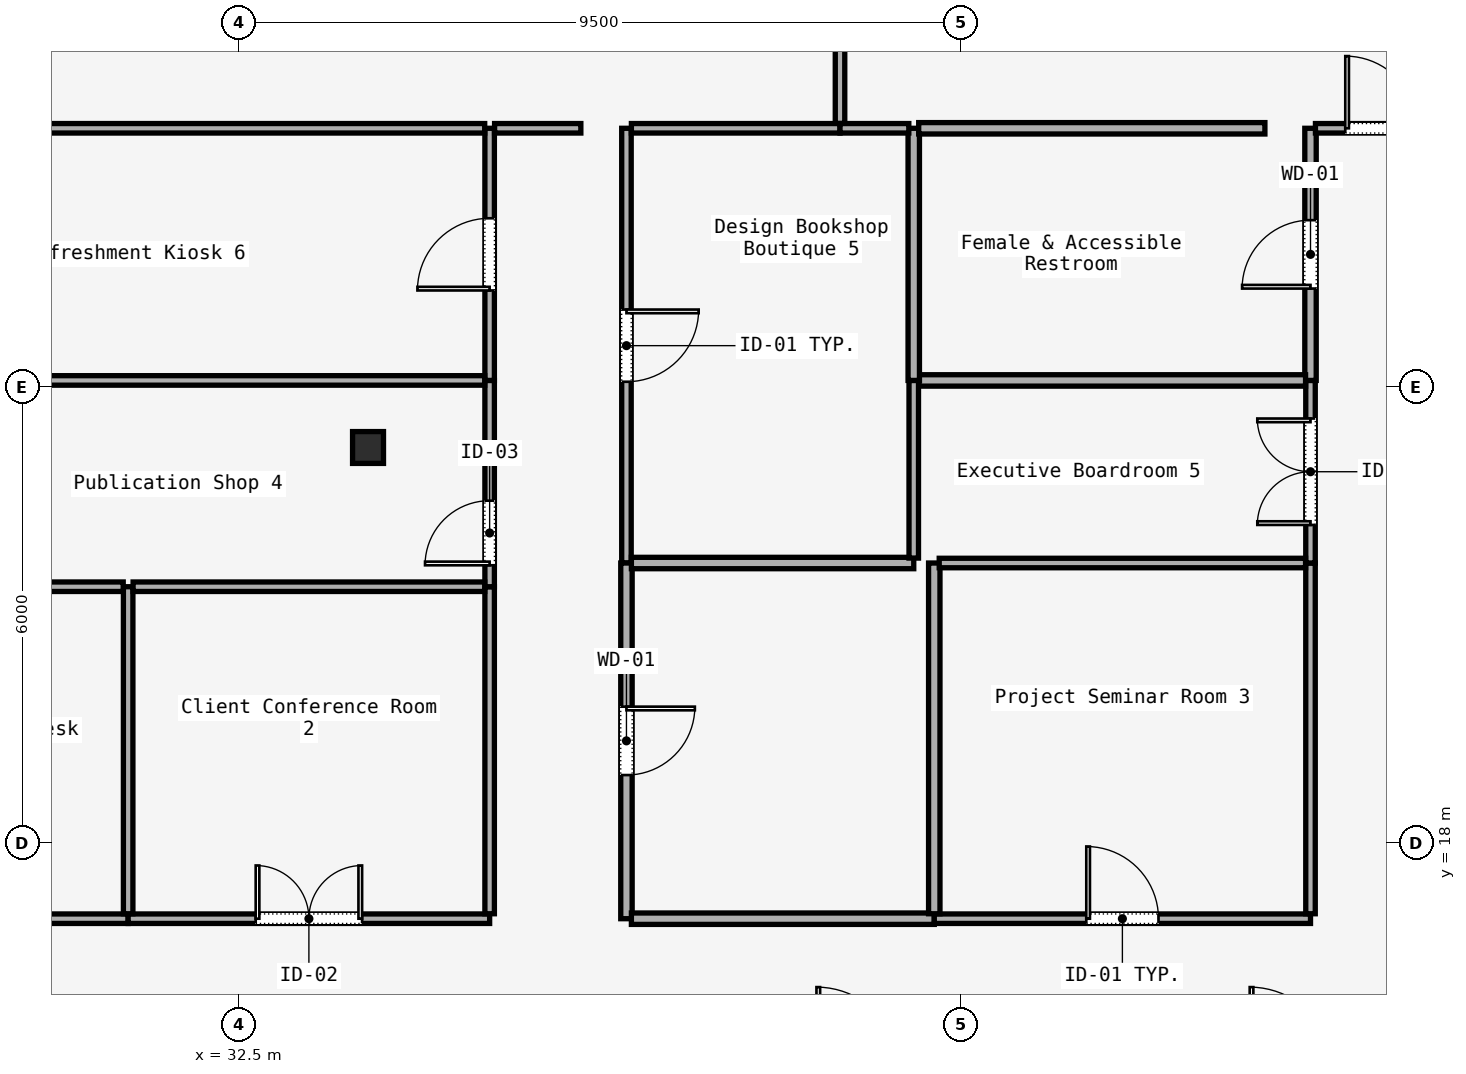
"""IFC4 building model, lengths in metres.
Left out: names, types, materials, properties, quantities, classifications, styles, units other than length and angle.
Written with IfcOpenShell. Run it as: python <this file> out.ifc"""

import sys

from ifc_helpers import new_model, si_unit, direction, frame, frame_2d, origin, origin_2d, place, context, subcontext, project, spatial, rectangle, i_section, extrude, element, fill, save


model = new_model("IFC4")
c1 = context("Model", 3, precision=1e-05, world=origin(), true_north=direction((0.0, 1.0)))
c2 = subcontext(c1, "Body", "Model", "MODEL_VIEW")
j1 = project(units=[si_unit("LENGTHUNIT", "METRE"), si_unit("PLANEANGLEUNIT", "RADIAN")], contexts=[c1])
p1 = place(None, origin())
s1 = spatial("IfcSite", under=j1, at=p1, CompositionType="ELEMENT")
p2 = place(p1, origin())
s2 = spatial("IfcBuilding", under=s1, at=p2, CompositionType="ELEMENT")
p3 = place(p2, frame((0.0, 0.0, 180.2)))
s3 = spatial("IfcBuildingStorey", under=s2, at=p3, CompositionType="ELEMENT", Elevation=180.2)
p4 = place(p3, frame((34.2, 23.2, 0.0), z_axis=(0.0, 0.0, 1.0), x_axis=(1.0, 0.0, 0.0)))
e1 = element("IfcColumn", 1, at=p4, inside=s3, PredefinedType="COLUMN", context=c2, shape_type="SweptSolid", body=[
    extrude(i_section(OverallWidth=0.407, OverallDepth=0.419, WebThickness=0.031, FlangeThickness=0.049, FilletRadius=0.015, at=origin_2d()), origin(), (0.0, 0.0, 1.0), 3.58),
])
p5 = place(p3, frame((27.6, 17.0, 0.0), z_axis=(0.0, 0.0, 1.0), x_axis=(1.0, 0.0, 0.0)))
e2 = element("IfcWall", 2, at=p5, inside=s3, PredefinedType="PARTITIONING", context=c2, shape_type="SweptSolid", body=[
    extrude(rectangle(XDim=3.444, YDim=0.125, at=frame_2d((1.722, 0.0))), origin(), (0.0, 0.0, 1.0), 3.01),
])
p6 = place(p5, frame((1.022, 0.0, 0.0)))
e3 = element("IfcOpeningElement", 3, at=p6, cuts=e2, PredefinedType="OPENING", context=c2, shape_type="SweptSolid", body=[
    extrude(rectangle(XDim=1.4, YDim=2.2, at=frame_2d((0.7, 1.1))), frame((0.0, 0.062, 0.0), z_axis=(0.0, -1.0, 0.0), x_axis=(1.0, 0.0, 0.0)), (0.0, 0.0, 1.0), 0.125),
])
p7 = place(p3, frame((31.044, 17.0, 0.0), z_axis=(0.0, 0.0, 1.0), x_axis=(1.0, 0.0, 0.0)))
e4 = element("IfcWall", 4, at=p7, inside=s3, PredefinedType="PARTITIONING", context=c2, shape_type="SweptSolid", body=[
    extrude(rectangle(XDim=4.756, YDim=0.125, at=frame_2d((2.378, 0.0))), origin(), (0.0, 0.0, 1.0), 3.01),
])
p8 = place(p7, frame((1.678, 0.0, 0.0)))
e5 = element("IfcOpeningElement", 5, at=p8, cuts=e4, PredefinedType="OPENING", context=c2, shape_type="SweptSolid", body=[
    extrude(rectangle(XDim=1.4, YDim=2.2, at=frame_2d((0.7, 1.1))), frame((0.0, 0.062, 0.0), z_axis=(0.0, -1.0, 0.0), x_axis=(1.0, 0.0, 0.0)), (0.0, 0.0, 1.0), 0.125),
])
p9 = place(p3, frame((35.8, 17.065, 0.0), z_axis=(0.0, 0.0, 1.0), x_axis=(0.0, 1.0, 0.0)))
e6 = element("IfcWall", 6, at=p9, inside=s3, PredefinedType="PARTITIONING", context=c2, shape_type="SweptSolid", body=[
    extrude(rectangle(XDim=4.303, YDim=0.125, at=frame_2d((2.151, 0.0))), origin(), (0.0, 0.0, 1.0), 3.01),
])
p10 = place(p3, frame((35.8, 21.368, 0.0), z_axis=(0.0, 0.0, 1.0), x_axis=(0.0, 1.0, 0.0)))
e7 = element("IfcWall", 7, at=p10, inside=s3, PredefinedType="PARTITIONING", context=c2, shape_type="SweptSolid", body=[
    extrude(rectangle(XDim=2.715, YDim=0.125, at=frame_2d((1.357, 0.0))), origin(), (0.0, 0.0, 1.0), 3.01),
])
p11 = place(p10, frame((0.282, 0.0, 0.0)))
e8 = element("IfcOpeningElement", 8, at=p11, cuts=e7, PredefinedType="OPENING", context=c2, shape_type="SweptSolid", body=[
    extrude(rectangle(XDim=0.85, YDim=2.15, at=frame_2d((0.425, 1.075))), frame((0.0, 0.062, 0.0), z_axis=(0.0, -1.0, 0.0), x_axis=(1.0, 0.0, 0.0)), (0.0, 0.0, 1.0), 0.125),
])
p12 = place(p3, frame((35.8, 24.083, 0.0), z_axis=(0.0, 0.0, 1.0), x_axis=(0.0, 1.0, 0.0)))
e9 = element("IfcWall", 9, at=p12, inside=s3, PredefinedType="PARTITIONING", context=c2, shape_type="SweptSolid", body=[
    extrude(rectangle(XDim=3.317, YDim=0.125, at=frame_2d((1.659, 0.0))), origin(), (0.0, 0.0, 1.0), 3.01),
])
p13 = place(p12, frame((1.184, 0.0, 0.0)))
e10 = element("IfcOpeningElement", 10, at=p13, cuts=e9, PredefinedType="OPENING", context=c2, shape_type="SweptSolid", body=[
    extrude(rectangle(XDim=0.95, YDim=2.2, at=frame_2d((0.475, 1.1))), frame((0.0, 0.062, 0.0), z_axis=(0.0, -1.0, 0.0), x_axis=(1.0, 0.0, 0.0)), (0.0, 0.0, 1.0), 0.125),
])
p14 = place(p3, frame((35.865, 27.4, 0.0), z_axis=(0.0, 0.0, 1.0), x_axis=(1.0, 0.0, 0.0)))
e11 = element("IfcWall", 11, at=p14, inside=s3, PredefinedType="PARTITIONING", context=c2, shape_type="SweptSolid", body=[
    extrude(rectangle(XDim=1.135, YDim=0.125, at=frame_2d((0.567, 0.0))), origin(), (0.0, 0.0, 1.0), 3.01),
])
p15 = place(p3, frame((37.6, 27.4, 0.0), z_axis=(0.0, 0.0, 1.0), x_axis=(0.0, -1.0, 0.0)))
e12 = element("IfcWall", 12, at=p15, inside=s3, PredefinedType="PARTITIONING", context=c2, shape_type="SweptSolid", body=[
    extrude(rectangle(XDim=5.72, YDim=0.125, at=frame_2d((2.86, 0.0))), origin(), (0.0, 0.0, 1.0), 3.01),
])
p16 = place(p15, frame((2.385, 0.0, 0.0)))
e13 = element("IfcOpeningElement", 13, at=p16, cuts=e12, PredefinedType="OPENING", context=c2, shape_type="SweptSolid", body=[
    extrude(rectangle(XDim=0.95, YDim=2.2, at=frame_2d((0.475, 1.1))), frame((0.0, 0.062, 0.0), z_axis=(0.0, -1.0, 0.0), x_axis=(1.0, 0.0, 0.0)), (0.0, 0.0, 1.0), 0.125),
])
p17 = place(p3, frame((37.6, 21.68, 0.0), z_axis=(0.0, 0.0, 1.0), x_axis=(0.0, -1.0, 0.0)))
e14 = element("IfcWall", 14, at=p17, inside=s3, PredefinedType="PARTITIONING", context=c2, shape_type="SweptSolid", body=[
    extrude(rectangle(XDim=4.68, YDim=0.15, at=frame_2d((2.34, 0.0))), origin(), (0.0, 0.0, 1.0), 3.01),
])
p18 = place(p17, frame((1.89, 0.0, 0.0)))
e15 = element("IfcOpeningElement", 15, at=p18, cuts=e14, PredefinedType="OPENING", context=c2, shape_type="SweptSolid", body=[
    extrude(rectangle(XDim=0.9, YDim=2.15, at=frame_2d((0.45, 1.075))), frame((0.0, 0.075, 0.0), z_axis=(0.0, -1.0, 0.0), x_axis=(1.0, 0.0, 0.0)), (0.0, 0.0, 1.0), 0.15),
])
p19 = place(p3, frame((37.665, 17.0, 0.0), z_axis=(0.0, 0.0, 1.0), x_axis=(1.0, 0.0, 0.0)))
e16 = element("IfcWall", 16, at=p19, inside=s3, PredefinedType="PARTITIONING", context=c2, shape_type="SweptSolid", body=[
    extrude(rectangle(XDim=3.985, YDim=0.15, at=frame_2d((1.992, 0.0))), origin(), (0.0, 0.0, 1.0), 3.01),
])
p20 = place(p3, frame((41.65, 17.0, 0.0), z_axis=(0.0, 0.0, 1.0), x_axis=(1.0, 0.0, 0.0)))
e17 = element("IfcWall", 17, at=p20, inside=s3, PredefinedType="PARTITIONING", context=c2, shape_type="SweptSolid", body=[
    extrude(rectangle(XDim=4.95, YDim=0.125, at=frame_2d((2.475, 0.0))), origin(), (0.0, 0.0, 1.0), 3.01),
])
p21 = place(p20, frame((2.0, 0.0, 0.0)))
e18 = element("IfcOpeningElement", 18, at=p21, cuts=e17, PredefinedType="OPENING", context=c2, shape_type="SweptSolid", body=[
    extrude(rectangle(XDim=0.95, YDim=2.2, at=frame_2d((0.475, 1.1))), frame((0.0, 0.062, 0.0), z_axis=(0.0, -1.0, 0.0), x_axis=(1.0, 0.0, 0.0)), (0.0, 0.0, 1.0), 0.125),
])
p22 = place(p3, frame((46.6, 17.065, 0.0), z_axis=(0.0, 0.0, 1.0), x_axis=(0.0, 1.0, 0.0)))
e19 = element("IfcWall", 19, at=p22, inside=s3, PredefinedType="PARTITIONING", context=c2, shape_type="SweptSolid", body=[
    extrude(rectangle(XDim=4.615, YDim=0.125, at=frame_2d((2.308, 0.0))), origin(), (0.0, 0.0, 1.0), 3.01),
])
p23 = place(p3, frame((46.6, 21.68, 0.0), z_axis=(0.0, 0.0, 1.0), x_axis=(0.0, 1.0, 0.0)))
e20 = element("IfcWall", 20, at=p23, inside=s3, PredefinedType="PARTITIONING", context=c2, shape_type="SweptSolid", body=[
    extrude(rectangle(XDim=2.403, YDim=0.125, at=frame_2d((1.201, 0.0))), origin(), (0.0, 0.0, 1.0), 3.01),
])
p24 = place(p23, frame((0.501, 0.0, 0.0)))
e21 = element("IfcOpeningElement", 21, at=p24, cuts=e20, PredefinedType="OPENING", context=c2, shape_type="SweptSolid", body=[
    extrude(rectangle(XDim=1.4, YDim=2.2, at=frame_2d((0.7, 1.1))), frame((0.0, 0.062, 0.0), z_axis=(0.0, -1.0, 0.0), x_axis=(1.0, 0.0, 0.0)), (0.0, 0.0, 1.0), 0.125),
])
p25 = place(p3, frame((46.6, 24.083, 0.0), z_axis=(0.0, 0.0, 1.0), x_axis=(0.0, 1.0, 0.0)))
e22 = element("IfcWall", 22, at=p25, inside=s3, PredefinedType="PARTITIONING", context=c2, shape_type="SweptSolid", body=[
    extrude(rectangle(XDim=3.317, YDim=0.15, at=frame_2d((1.659, 0.0))), origin(), (0.0, 0.0, 1.0), 3.01),
])
p26 = place(p25, frame((1.209, 0.0, 0.0)))
e23 = element("IfcOpeningElement", 23, at=p26, cuts=e22, PredefinedType="OPENING", context=c2, shape_type="SweptSolid", body=[
    extrude(rectangle(XDim=0.9, YDim=2.15, at=frame_2d((0.45, 1.075))), frame((0.0, 0.075, 0.0), z_axis=(0.0, -1.0, 0.0), x_axis=(1.0, 0.0, 0.0)), (0.0, 0.0, 1.0), 0.15),
])
p27 = place(p3, frame((46.665, 27.4, 0.0), z_axis=(0.0, 0.0, 1.0), x_axis=(1.0, 0.0, 0.0)))
e24 = element("IfcWall", 24, at=p27, inside=s3, PredefinedType="PARTITIONING", context=c2, shape_type="SweptSolid", body=[
    extrude(rectangle(XDim=1.735, YDim=0.125, at=frame_2d((0.867, 0.0))), origin(), (0.0, 0.0, 1.0), 3.01),
])
p28 = place(p27, frame((0.393, 0.0, 0.0)))
e25 = element("IfcOpeningElement", 25, at=p28, cuts=e24, PredefinedType="OPENING", context=c2, shape_type="SweptSolid", body=[
    extrude(rectangle(XDim=0.95, YDim=2.2, at=frame_2d((0.475, 1.1))), frame((0.0, 0.062, 0.0), z_axis=(0.0, -1.0, 0.0), x_axis=(1.0, 0.0, 0.0)), (0.0, 0.0, 1.0), 0.125),
])
p29 = place(p3, frame((31.044, 21.368, 0.0), z_axis=(0.0, 0.0, 1.0), x_axis=(0.0, -1.0, 0.0)))
e26 = element("IfcWall", 26, at=p29, inside=s3, PredefinedType="PARTITIONING", context=c2, shape_type="SweptSolid", body=[
    extrude(rectangle(XDim=4.303, YDim=0.125, at=frame_2d((2.151, 0.0))), origin(), (0.0, 0.0, 1.0), 3.01),
])
p30 = place(p3, frame((27.665, 21.368, 0.0), z_axis=(0.0, 0.0, 1.0), x_axis=(1.0, 0.0, 0.0)))
e27 = element("IfcWall", 27, at=p30, inside=s3, PredefinedType="PARTITIONING", context=c2, shape_type="SweptSolid", body=[
    extrude(rectangle(XDim=3.314, YDim=0.125, at=frame_2d((1.657, 0.0))), origin(), (0.0, 0.0, 1.0), 3.01),
])
p31 = place(p3, frame((31.109, 21.368, 0.0), z_axis=(0.0, 0.0, 1.0), x_axis=(1.0, 0.0, 0.0)))
e28 = element("IfcWall", 28, at=p31, inside=s3, PredefinedType="PARTITIONING", context=c2, shape_type="SweptSolid", body=[
    extrude(rectangle(XDim=4.626, YDim=0.125, at=frame_2d((2.313, 0.0))), origin(), (0.0, 0.0, 1.0), 3.01),
])
p32 = place(p3, frame((41.65, 21.68, 0.0), z_axis=(0.0, 0.0, 1.0), x_axis=(0.0, -1.0, 0.0)))
e29 = element("IfcWall", 29, at=p32, inside=s3, PredefinedType="PARTITIONING", context=c2, shape_type="SweptSolid", body=[
    extrude(rectangle(XDim=4.615, YDim=0.15, at=frame_2d((2.308, 0.0))), origin(), (0.0, 0.0, 1.0), 3.01),
])
p33 = place(p3, frame((37.665, 21.68, 0.0), z_axis=(0.0, 0.0, 1.0), x_axis=(1.0, 0.0, 0.0)))
e30 = element("IfcWall", 30, at=p33, inside=s3, PredefinedType="PARTITIONING", context=c2, shape_type="SweptSolid", body=[
    extrude(rectangle(XDim=3.715, YDim=0.15, at=frame_2d((1.857, 0.0))), origin(), (0.0, 0.0, 1.0), 3.01),
])
p34 = place(p3, frame((41.715, 21.68, 0.0), z_axis=(0.0, 0.0, 1.0), x_axis=(1.0, 0.0, 0.0)))
e31 = element("IfcWall", 31, at=p34, inside=s3, PredefinedType="PARTITIONING", context=c2, shape_type="SweptSolid", body=[
    extrude(rectangle(XDim=4.82, YDim=0.125, at=frame_2d((2.41, 0.0))), origin(), (0.0, 0.0, 1.0), 3.01),
])
p35 = place(p3, frame((27.665, 24.083, 0.0), z_axis=(0.0, 0.0, 1.0), x_axis=(1.0, 0.0, 0.0)))
e32 = element("IfcWall", 32, at=p35, inside=s3, PredefinedType="PARTITIONING", context=c2, shape_type="SweptSolid", body=[
    extrude(rectangle(XDim=8.07, YDim=0.125, at=frame_2d((4.035, 0.0))), origin(), (0.0, 0.0, 1.0), 3.01),
])
p36 = place(p3, frame((41.38, 21.745, 0.0), z_axis=(0.0, 0.0, 1.0), x_axis=(0.0, 1.0, 0.0)))
e33 = element("IfcWall", 33, at=p36, inside=s3, PredefinedType="PARTITIONING", context=c2, shape_type="SweptSolid", body=[
    extrude(rectangle(XDim=2.337, YDim=0.125, at=frame_2d((1.169, 0.0))), origin(), (0.0, 0.0, 1.0), 3.01),
])
p37 = place(p3, frame((41.445, 24.083, 0.0), z_axis=(0.0, 0.0, 1.0), x_axis=(1.0, 0.0, 0.0)))
e34 = element("IfcWall", 34, at=p37, inside=s3, PredefinedType="PARTITIONING", context=c2, shape_type="SweptSolid", body=[
    extrude(rectangle(XDim=5.09, YDim=0.15, at=frame_2d((2.545, 0.0))), origin(), (0.0, 0.0, 1.0), 3.01),
])
p38 = place(p3, frame((41.38, 27.4, 0.0), z_axis=(0.0, 0.0, 1.0), x_axis=(0.0, -1.0, 0.0)))
e35 = element("IfcWall", 35, at=p38, inside=s3, PredefinedType="PARTITIONING", context=c2, shape_type="SweptSolid", body=[
    extrude(rectangle(XDim=3.317, YDim=0.15, at=frame_2d((1.659, 0.0))), origin(), (0.0, 0.0, 1.0), 3.01),
])
p39 = place(p3, frame((37.665, 27.4, 0.0), z_axis=(0.0, 0.0, 1.0), x_axis=(1.0, 0.0, 0.0)))
e36 = element("IfcWall", 36, at=p39, inside=s3, PredefinedType="PARTITIONING", context=c2, shape_type="SweptSolid", body=[
    extrude(rectangle(XDim=2.745, YDim=0.125, at=frame_2d((1.373, 0.0))), origin(), (0.0, 0.0, 1.0), 3.01),
])
p40 = place(p3, frame((40.41, 27.4, 0.0), z_axis=(0.0, 0.0, 1.0), x_axis=(1.0, 0.0, 0.0)))
e37 = element("IfcWall", 37, at=p40, inside=s3, PredefinedType="PARTITIONING", context=c2, shape_type="SweptSolid", body=[
    extrude(rectangle(XDim=0.905, YDim=0.125, at=frame_2d((0.453, 0.0))), origin(), (0.0, 0.0, 1.0), 3.01),
])
p41 = place(p3, frame((27.6, 27.4, 0.0), z_axis=(0.0, 0.0, 1.0), x_axis=(1.0, 0.0, 0.0)))
e38 = element("IfcWall", 38, at=p41, inside=s3, PredefinedType="PARTITIONING", context=c2, shape_type="SweptSolid", body=[
    extrude(rectangle(XDim=8.135, YDim=0.125, at=frame_2d((4.067, 0.0))), origin(), (0.0, 0.0, 1.0), 3.01),
])
p42 = place(p3, frame((41.445, 27.4, 0.0), z_axis=(0.0, 0.0, 1.0), x_axis=(1.0, 0.0, 0.0)))
e39 = element("IfcWall", 39, at=p42, inside=s3, PredefinedType="PARTITIONING", context=c2, shape_type="SweptSolid", body=[
    extrude(rectangle(XDim=4.555, YDim=0.15, at=frame_2d((2.277, 0.0))), origin(), (0.0, 0.0, 1.0), 3.01),
])
p43 = place(p3, frame((40.41, 46.248, 0.0), z_axis=(0.0, 0.0, 1.0), x_axis=(0.0, -1.0, 0.0)))
e40 = element("IfcWall", 40, at=p43, inside=s3, PredefinedType="PARTITIONING", context=c2, shape_type="SweptSolid", body=[
    extrude(rectangle(XDim=18.783, YDim=0.125, at=frame_2d((9.392, 0.0))), origin(), (0.0, 0.0, 1.0), 3.01),
])
p44 = place(p43, frame((8.967, 0.0, 0.0)))
e41 = element("IfcOpeningElement", 41, at=p44, cuts=e40, PredefinedType="OPENING", context=c2, shape_type="SweptSolid", body=[
    extrude(rectangle(XDim=0.85, YDim=2.15, at=frame_2d((0.425, 1.075))), frame((0.0, 0.062, 0.0), z_axis=(0.0, -1.0, 0.0), x_axis=(1.0, 0.0, 0.0)), (0.0, 0.0, 1.0), 0.125),
])
p45 = place(p8, origin())
e42 = element("IfcDoor", 42, at=p45, inside=s3, OperationType="SINGLE_SWING_RIGHT", PredefinedType="DOOR", context=c2, shape_type="SweptSolid", body=[
    extrude(rectangle(XDim=1.4, YDim=2.2, at=frame_2d((0.7, 1.1))), frame((0.0, 0.025, 0.0), z_axis=(0.0, -1.0, 0.0), x_axis=(1.0, 0.0, 0.0)), (0.0, 0.0, 1.0), 0.05),
])
fill(e5, e42)
p46 = place(p18, origin())
e43 = element("IfcDoor", 43, at=p46, inside=s3, OperationType="SINGLE_SWING_LEFT", PredefinedType="DOOR", context=c2, shape_type="SweptSolid", body=[
    extrude(rectangle(XDim=0.9, YDim=2.15, at=frame_2d((0.45, 1.075))), frame((0.0, 0.025, 0.0), z_axis=(0.0, -1.0, 0.0), x_axis=(1.0, 0.0, 0.0)), (0.0, 0.0, 1.0), 0.05),
])
fill(e15, e43)
p47 = place(p21, origin())
e44 = element("IfcDoor", 44, at=p47, inside=s3, OperationType="SINGLE_SWING_RIGHT", PredefinedType="DOOR", context=c2, shape_type="SweptSolid", body=[
    extrude(rectangle(XDim=0.95, YDim=2.2, at=frame_2d((0.475, 1.1))), frame((0.0, 0.025, 0.0), z_axis=(0.0, -1.0, 0.0), x_axis=(1.0, 0.0, 0.0)), (0.0, 0.0, 1.0), 0.05),
])
fill(e18, e44)
p48 = place(p11, origin())
e45 = element("IfcDoor", 45, at=p48, inside=s3, OperationType="SINGLE_SWING_LEFT", PredefinedType="DOOR", context=c2, shape_type="SweptSolid", body=[
    extrude(rectangle(XDim=0.85, YDim=2.15, at=frame_2d((0.425, 1.075))), frame((0.0, 0.025, 0.0), z_axis=(0.0, -1.0, 0.0), x_axis=(1.0, 0.0, 0.0)), (0.0, 0.0, 1.0), 0.05),
])
fill(e8, e45)
p49 = place(p24, origin())
e46 = element("IfcDoor", 46, at=p49, inside=s3, OperationType="SINGLE_SWING_LEFT", PredefinedType="DOOR", context=c2, shape_type="SweptSolid", body=[
    extrude(rectangle(XDim=1.4, YDim=2.2, at=frame_2d((0.7, 1.1))), frame((0.0, 0.025, 0.0), z_axis=(0.0, -1.0, 0.0), x_axis=(1.0, 0.0, 0.0)), (0.0, 0.0, 1.0), 0.05),
])
fill(e21, e46)
p50 = place(p16, origin())
e47 = element("IfcDoor", 47, at=p50, inside=s3, OperationType="SINGLE_SWING_RIGHT", PredefinedType="DOOR", context=c2, shape_type="SweptSolid", body=[
    extrude(rectangle(XDim=0.95, YDim=2.2, at=frame_2d((0.475, 1.1))), frame((0.0, 0.025, 0.0), z_axis=(0.0, -1.0, 0.0), x_axis=(1.0, 0.0, 0.0)), (0.0, 0.0, 1.0), 0.05),
])
fill(e13, e47)
p51 = place(p13, origin())
e48 = element("IfcDoor", 48, at=p51, inside=s3, OperationType="SINGLE_SWING_RIGHT", PredefinedType="DOOR", context=c2, shape_type="SweptSolid", body=[
    extrude(rectangle(XDim=0.95, YDim=2.2, at=frame_2d((0.475, 1.1))), frame((0.0, 0.025, 0.0), z_axis=(0.0, -1.0, 0.0), x_axis=(1.0, 0.0, 0.0)), (0.0, 0.0, 1.0), 0.05),
])
fill(e10, e48)
p52 = place(p26, origin())
e49 = element("IfcDoor", 49, at=p52, inside=s3, OperationType="SINGLE_SWING_LEFT", PredefinedType="DOOR", context=c2, shape_type="SweptSolid", body=[
    extrude(rectangle(XDim=0.9, YDim=2.15, at=frame_2d((0.45, 1.075))), frame((0.0, 0.025, 0.0), z_axis=(0.0, -1.0, 0.0), x_axis=(1.0, 0.0, 0.0)), (0.0, 0.0, 1.0), 0.05),
])
fill(e23, e49)
p53 = place(p28, origin())
e50 = element("IfcDoor", 50, at=p53, inside=s3, OperationType="SINGLE_SWING_LEFT", PredefinedType="DOOR", context=c2, shape_type="SweptSolid", body=[
    extrude(rectangle(XDim=0.95, YDim=2.2, at=frame_2d((0.475, 1.1))), frame((0.0, 0.025, 0.0), z_axis=(0.0, -1.0, 0.0), x_axis=(1.0, 0.0, 0.0)), (0.0, 0.0, 1.0), 0.05),
])
fill(e25, e50)
save(model, sys.argv[1])
